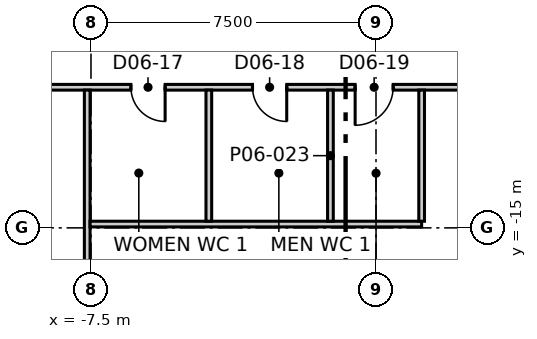
"""IFC4 building model, lengths in metres.
Left out: names, types, materials, properties, quantities, classifications, styles, units other than length and angle.
Written with IfcOpenShell. Run it as: python <this file> out.ifc"""

import sys

from ifc_helpers import new_model, si_unit, direction, frame, frame_2d, origin, place, context, subcontext, project, spatial, rectangle, extrude, element, fill, save


model = new_model("IFC4")
c1 = context("Model", 3, precision=1e-05, world=origin(), true_north=direction((0.0, 1.0)))
c2 = subcontext(c1, "Body", "Model", "MODEL_VIEW")
j1 = project(units=[si_unit("LENGTHUNIT", "METRE"), si_unit("PLANEANGLEUNIT", "RADIAN")], contexts=[c1])
p1 = place(None, origin())
s1 = spatial("IfcSite", under=j1, at=p1, CompositionType="ELEMENT")
p2 = place(p1, origin())
s2 = spatial("IfcBuilding", under=s1, at=p2, CompositionType="ELEMENT")
p3 = place(p2, frame((0.0, 0.0, 35.3)))
s3 = spatial("IfcBuildingStorey", under=s2, at=p3, CompositionType="ELEMENT", Elevation=35.3)
p4 = place(p3, frame((-3.462, 38.603, 0.0), z_axis=(0.0, 0.0, 1.0), x_axis=(-0.500012207976, -0.866018355391, 0.0)))
e1 = element("IfcWall", 1, at=p4, inside=s3, PredefinedType="ELEMENTEDWALL", context=c2, shape_type="SweptSolid", body=[
    extrude(rectangle(XDim=63.381, YDim=0.2, at=frame_2d((31.69, 0.0))), origin(), (0.0, 0.0, 1.0), 3.7),
])
p5 = place(p4, frame((2.302, 0.0, 0.9)))
e2 = element("IfcOpeningElement", 2, at=p5, cuts=e1, PredefinedType="OPENING", context=c2, shape_type="SweptSolid", body=[
    extrude(rectangle(XDim=5.6, YDim=2.5, at=frame_2d((2.8, 1.25))), frame((0.0, 0.11, 0.0), z_axis=(0.0, -1.0, 0.0), x_axis=(1.0, 0.0, 0.0)), (0.0, 0.0, 1.0), 0.22),
])
p6 = place(p4, frame((9.902, 0.0, 0.9)))
e3 = element("IfcOpeningElement", 3, at=p6, cuts=e1, PredefinedType="OPENING", context=c2, shape_type="SweptSolid", body=[
    extrude(rectangle(XDim=5.6, YDim=2.5, at=frame_2d((2.8, 1.25))), frame((0.0, 0.11, 0.0), z_axis=(0.0, -1.0, 0.0), x_axis=(1.0, 0.0, 0.0)), (0.0, 0.0, 1.0), 0.22),
])
p7 = place(p4, frame((17.501, 0.0, 0.9)))
e4 = element("IfcOpeningElement", 4, at=p7, cuts=e1, PredefinedType="OPENING", context=c2, shape_type="SweptSolid", body=[
    extrude(rectangle(XDim=5.6, YDim=2.5, at=frame_2d((2.8, 1.25))), frame((0.0, 0.11, 0.0), z_axis=(0.0, -1.0, 0.0), x_axis=(1.0, 0.0, 0.0)), (0.0, 0.0, 1.0), 0.22),
])
p8 = place(p4, frame((25.1, 0.0, 0.9)))
e5 = element("IfcOpeningElement", 5, at=p8, cuts=e1, PredefinedType="OPENING", context=c2, shape_type="SweptSolid", body=[
    extrude(rectangle(XDim=5.6, YDim=2.5, at=frame_2d((2.8, 1.25))), frame((0.0, 0.11, 0.0), z_axis=(0.0, -1.0, 0.0), x_axis=(1.0, 0.0, 0.0)), (0.0, 0.0, 1.0), 0.22),
])
p9 = place(p4, frame((32.7, 0.0, 0.9)))
e6 = element("IfcOpeningElement", 6, at=p9, cuts=e1, PredefinedType="OPENING", context=c2, shape_type="SweptSolid", body=[
    extrude(rectangle(XDim=5.6, YDim=2.5, at=frame_2d((2.8, 1.25))), frame((0.0, 0.11, 0.0), z_axis=(0.0, -1.0, 0.0), x_axis=(1.0, 0.0, 0.0)), (0.0, 0.0, 1.0), 0.22),
])
p10 = place(p4, frame((40.299, 0.0, 0.9)))
e7 = element("IfcOpeningElement", 7, at=p10, cuts=e1, PredefinedType="OPENING", context=c2, shape_type="SweptSolid", body=[
    extrude(rectangle(XDim=5.6, YDim=2.5, at=frame_2d((2.8, 1.25))), frame((0.0, 0.11, 0.0), z_axis=(0.0, -1.0, 0.0), x_axis=(1.0, 0.0, 0.0)), (0.0, 0.0, 1.0), 0.22),
])
p11 = place(p4, frame((47.899, 0.0, 0.9)))
e8 = element("IfcOpeningElement", 8, at=p11, cuts=e1, PredefinedType="OPENING", context=c2, shape_type="SweptSolid", body=[
    extrude(rectangle(XDim=5.6, YDim=2.5, at=frame_2d((2.8, 1.25))), frame((0.0, 0.11, 0.0), z_axis=(0.0, -1.0, 0.0), x_axis=(1.0, 0.0, 0.0)), (0.0, 0.0, 1.0), 0.22),
])
p12 = place(p4, frame((55.498, 0.0, 0.9)))
e9 = element("IfcOpeningElement", 9, at=p12, cuts=e1, PredefinedType="OPENING", context=c2, shape_type="SweptSolid", body=[
    extrude(rectangle(XDim=5.6, YDim=2.5, at=frame_2d((2.8, 1.25))), frame((0.0, 0.11, 0.0), z_axis=(0.0, -1.0, 0.0), x_axis=(1.0, 0.0, 0.0)), (0.0, 0.0, 1.0), 0.22),
])
p13 = place(p3, frame((-19.497, -11.17, 0.0), z_axis=(0.0, 0.0, 1.0), x_axis=(0.499998854553, 0.866026065108, 0.0)))
e10 = element("IfcWall", 10, at=p13, inside=s3, PredefinedType="PARTITIONING", context=c2, shape_type="SweptSolid", body=[
    extrude(rectangle(XDim=38.994, YDim=0.15, at=frame_2d((19.497, 0.0))), origin(), (0.0, 0.0, 1.0), 3.7),
])
p14 = place(p13, frame((36.244, 0.0, 0.0)))
e11 = element("IfcOpeningElement", 11, at=p14, cuts=e10, PredefinedType="OPENING", context=c2, shape_type="SweptSolid", body=[
    extrude(rectangle(XDim=1.1, YDim=2.1, at=frame_2d((0.55, 1.05))), frame((0.0, 0.085, 0.0), z_axis=(0.0, -1.0, 0.0), x_axis=(1.0, 0.0, 0.0)), (0.0, 0.0, 1.0), 0.17),
])
p15 = place(p13, frame((29.171, 0.0, 0.0)))
e12 = element("IfcOpeningElement", 12, at=p15, cuts=e10, PredefinedType="OPENING", context=c2, shape_type="SweptSolid", body=[
    extrude(rectangle(XDim=1.0, YDim=2.1, at=frame_2d((0.5, 1.05))), frame((0.0, 0.085, 0.0), z_axis=(0.0, -1.0, 0.0), x_axis=(1.0, 0.0, 0.0)), (0.0, 0.0, 1.0), 0.17),
])
p16 = place(p13, frame((32.971, 0.0, 0.0)))
e13 = element("IfcOpeningElement", 13, at=p16, cuts=e10, PredefinedType="OPENING", context=c2, shape_type="SweptSolid", body=[
    extrude(rectangle(XDim=0.9, YDim=2.1, at=frame_2d((0.45, 1.05))), frame((0.0, 0.085, 0.0), z_axis=(0.0, -1.0, 0.0), x_axis=(1.0, 0.0, 0.0)), (0.0, 0.0, 1.0), 0.17),
])
p17 = place(p13, frame((22.771, 0.0, 0.0)))
e14 = element("IfcOpeningElement", 14, at=p17, cuts=e10, PredefinedType="OPENING", context=c2, shape_type="SweptSolid", body=[
    extrude(rectangle(XDim=1.0, YDim=2.1, at=frame_2d((0.5, 1.05))), frame((0.0, 0.085, 0.0), z_axis=(0.0, -1.0, 0.0), x_axis=(1.0, 0.0, 0.0)), (0.0, 0.0, 1.0), 0.17),
])
p18 = place(p13, frame((6.872, 0.0, 0.0)))
e15 = element("IfcOpeningElement", 15, at=p18, cuts=e10, PredefinedType="OPENING", context=c2, shape_type="SweptSolid", body=[
    extrude(rectangle(XDim=1.1, YDim=2.1, at=frame_2d((0.55, 1.05))), frame((0.0, 0.085, 0.0), z_axis=(0.0, -1.0, 0.0), x_axis=(1.0, 0.0, 0.0)), (0.0, 0.0, 1.0), 0.17),
])
p19 = place(p13, frame((17.372, 0.0, 0.0)))
e16 = element("IfcOpeningElement", 16, at=p19, cuts=e10, PredefinedType="OPENING", context=c2, shape_type="SweptSolid", body=[
    extrude(rectangle(XDim=0.9, YDim=2.1, at=frame_2d((0.45, 1.05))), frame((0.0, 0.085, 0.0), z_axis=(0.0, -1.0, 0.0), x_axis=(1.0, 0.0, 0.0)), (0.0, 0.0, 1.0), 0.17),
])
p20 = place(p13, frame((14.172, 0.0, 0.0)))
e17 = element("IfcOpeningElement", 17, at=p20, cuts=e10, PredefinedType="OPENING", context=c2, shape_type="SweptSolid", body=[
    extrude(rectangle(XDim=0.9, YDim=2.1, at=frame_2d((0.45, 1.05))), frame((0.0, 0.085, 0.0), z_axis=(0.0, -1.0, 0.0), x_axis=(1.0, 0.0, 0.0)), (0.0, 0.0, 1.0), 0.17),
])
p21 = place(p13, frame((11.272, 0.0, 0.0)))
e18 = element("IfcOpeningElement", 18, at=p21, cuts=e10, PredefinedType="OPENING", context=c2, shape_type="SweptSolid", body=[
    extrude(rectangle(XDim=1.0, YDim=2.1, at=frame_2d((0.5, 1.05))), frame((0.0, 0.085, 0.0), z_axis=(0.0, -1.0, 0.0), x_axis=(1.0, 0.0, 0.0)), (0.0, 0.0, 1.0), 0.17),
])
p22 = place(p13, frame((1.473, 0.0, 0.0)))
e19 = element("IfcOpeningElement", 19, at=p22, cuts=e10, PredefinedType="OPENING", context=c2, shape_type="SweptSolid", body=[
    extrude(rectangle(XDim=1.1, YDim=2.1, at=frame_2d((0.55, 1.05))), frame((0.0, 0.085, 0.0), z_axis=(0.0, -1.0, 0.0), x_axis=(1.0, 0.0, 0.0)), (0.0, 0.0, 1.0), 0.17),
])
p23 = place(p3, frame((-19.422, -11.3, 0.0), z_axis=(0.0, 0.0, 1.0), x_axis=(1.0, 0.0, 0.0)))
e20 = element("IfcWall", 20, at=p23, inside=s3, PredefinedType="PARTITIONING", context=c2, shape_type="SweptSolid", body=[
    extrude(rectangle(XDim=38.994, YDim=0.15, at=frame_2d((19.497, 0.0))), origin(), (0.0, 0.0, 1.0), 3.7),
])
p24 = place(p23, frame((1.5, 0.0, 0.0)))
e21 = element("IfcOpeningElement", 21, at=p24, cuts=e20, PredefinedType="OPENING", context=c2, shape_type="SweptSolid", body=[
    extrude(rectangle(XDim=1.1, YDim=2.1, at=frame_2d((0.55, 1.05))), frame((0.0, 0.085, 0.0), z_axis=(0.0, -1.0, 0.0), x_axis=(1.0, 0.0, 0.0)), (0.0, 0.0, 1.0), 0.17),
])
p25 = place(p23, frame((8.674, 0.0, 0.0)))
e22 = element("IfcOpeningElement", 22, at=p25, cuts=e20, PredefinedType="OPENING", context=c2, shape_type="SweptSolid", body=[
    extrude(rectangle(XDim=1.0, YDim=2.1, at=frame_2d((0.5, 1.05))), frame((0.0, 0.085, 0.0), z_axis=(0.0, -1.0, 0.0), x_axis=(1.0, 0.0, 0.0)), (0.0, 0.0, 1.0), 0.17),
])
p26 = place(p23, frame((4.974, 0.0, 0.0)))
e23 = element("IfcOpeningElement", 23, at=p26, cuts=e20, PredefinedType="OPENING", context=c2, shape_type="SweptSolid", body=[
    extrude(rectangle(XDim=0.9, YDim=2.1, at=frame_2d((0.45, 1.05))), frame((0.0, 0.085, 0.0), z_axis=(0.0, -1.0, 0.0), x_axis=(1.0, 0.0, 0.0)), (0.0, 0.0, 1.0), 0.17),
])
p27 = place(p23, frame((23.273, 0.0, 0.0)))
e24 = element("IfcOpeningElement", 24, at=p27, cuts=e20, PredefinedType="OPENING", context=c2, shape_type="SweptSolid", body=[
    extrude(rectangle(XDim=1.1, YDim=2.1, at=frame_2d((0.55, 1.05))), frame((0.0, 0.085, 0.0), z_axis=(0.0, -1.0, 0.0), x_axis=(1.0, 0.0, 0.0)), (0.0, 0.0, 1.0), 0.17),
])
p28 = place(p23, frame((12.973, 0.0, 0.0)))
e25 = element("IfcOpeningElement", 25, at=p28, cuts=e20, PredefinedType="OPENING", context=c2, shape_type="SweptSolid", body=[
    extrude(rectangle(XDim=0.9, YDim=2.1, at=frame_2d((0.45, 1.05))), frame((0.0, 0.085, 0.0), z_axis=(0.0, -1.0, 0.0), x_axis=(1.0, 0.0, 0.0)), (0.0, 0.0, 1.0), 0.17),
])
p29 = place(p23, frame((16.173, 0.0, 0.0)))
e26 = element("IfcOpeningElement", 26, at=p29, cuts=e20, PredefinedType="OPENING", context=c2, shape_type="SweptSolid", body=[
    extrude(rectangle(XDim=0.9, YDim=2.1, at=frame_2d((0.45, 1.05))), frame((0.0, 0.085, 0.0), z_axis=(0.0, -1.0, 0.0), x_axis=(1.0, 0.0, 0.0)), (0.0, 0.0, 1.0), 0.17),
])
p30 = place(p23, frame((18.873, 0.0, 0.0)))
e27 = element("IfcOpeningElement", 27, at=p30, cuts=e20, PredefinedType="OPENING", context=c2, shape_type="SweptSolid", body=[
    extrude(rectangle(XDim=1.0, YDim=2.1, at=frame_2d((0.5, 1.05))), frame((0.0, 0.085, 0.0), z_axis=(0.0, -1.0, 0.0), x_axis=(1.0, 0.0, 0.0)), (0.0, 0.0, 1.0), 0.17),
])
p31 = place(p23, frame((32.471, 0.0, 0.0)))
e28 = element("IfcOpeningElement", 28, at=p31, cuts=e20, PredefinedType="OPENING", context=c2, shape_type="SweptSolid", body=[
    extrude(rectangle(XDim=1.0, YDim=2.1, at=frame_2d((0.5, 1.05))), frame((0.0, 0.085, 0.0), z_axis=(0.0, -1.0, 0.0), x_axis=(1.0, 0.0, 0.0)), (0.0, 0.0, 1.0), 0.17),
])
p32 = place(p3, frame((-7.599, -22.22, 0.0), z_axis=(0.0, 0.0, 1.0), x_axis=(0.0, 1.0, 0.0)))
e29 = element("IfcWall", 29, at=p32, inside=s3, PredefinedType="PARTITIONING", context=c2, shape_type="SweptSolid", body=[
    extrude(rectangle(XDim=10.845, YDim=0.15, at=frame_2d((5.422, 0.0))), origin(), (0.0, 0.0, 1.0), 3.7),
])
p33 = place(p3, frame((-7.524, -14.9, 0.0), z_axis=(0.0, 0.0, 1.0), x_axis=(1.0, 0.0, 0.0)))
e30 = element("IfcWall", 30, at=p33, inside=s3, PredefinedType="PARTITIONING", context=c2, shape_type="SweptSolid", body=[
    extrude(rectangle(XDim=8.725, YDim=0.15, at=frame_2d((4.362, 0.0))), origin(), (0.0, 0.0, 1.0), 3.7),
])
for number, where, z_axis, x_axis in (
    (31, (-4.399, -14.825, 0.0), (0.0, 0.0, 1.0), (0.0, 1.0, 0.0)),
    (32, (1.201, -14.825, 0.0), (0.0, 0.0, 1.0), (0.0, 1.0, 0.0)),
    (33, (-1.199, -14.825, 0.0), (0.0, 0.0, 1.0), (0.0, 1.0, 0.0)),
):
    element("IfcWall", number, at=place(p3, frame(where, z_axis=z_axis, x_axis=x_axis)), inside=s3, PredefinedType="PARTITIONING", context=c2, shape_type="SweptSolid", body=[
        extrude(rectangle(XDim=3.45, YDim=0.15, at=frame_2d((1.725, 0.0))), origin(), (0.0, 0.0, 1.0), 3.7),
    ])
p34 = place(p3, frame((0.075, 22.47, 0.0), z_axis=(0.0, 0.0, 1.0), x_axis=(0.500002280369, -0.866024087209, 0.0)))
e34 = element("IfcWall", 34, at=p34, inside=s3, PredefinedType="PARTITIONING", context=c2, shape_type="SweptSolid", body=[
    extrude(rectangle(XDim=38.844, YDim=0.15, at=frame_2d((19.422, 0.0))), origin(), (0.0, 0.0, 1.0), 3.7),
])
p35 = place(p34, frame((36.244, 0.0, 0.0)))
e35 = element("IfcOpeningElement", 35, at=p35, cuts=e34, PredefinedType="OPENING", context=c2, shape_type="SweptSolid", body=[
    extrude(rectangle(XDim=1.1, YDim=2.1, at=frame_2d((0.55, 1.05))), frame((0.0, 0.085, 0.0), z_axis=(0.0, -1.0, 0.0), x_axis=(1.0, 0.0, 0.0)), (0.0, 0.0, 1.0), 0.17),
])
p36 = place(p34, frame((26.472, 0.0, 0.0)))
e36 = element("IfcOpeningElement", 36, at=p36, cuts=e34, PredefinedType="OPENING", context=c2, shape_type="SweptSolid", body=[
    extrude(rectangle(XDim=1.1, YDim=2.1, at=frame_2d((0.55, 1.05))), frame((0.0, 0.085, 0.0), z_axis=(0.0, -1.0, 0.0), x_axis=(1.0, 0.0, 0.0)), (0.0, 0.0, 1.0), 0.17),
])
p37 = place(p34, frame((8.872, 0.0, 0.0)))
e37 = element("IfcOpeningElement", 37, at=p37, cuts=e34, PredefinedType="OPENING", context=c2, shape_type="SweptSolid", body=[
    extrude(rectangle(XDim=1.1, YDim=2.1, at=frame_2d((0.55, 1.05))), frame((0.0, 0.085, 0.0), z_axis=(0.0, -1.0, 0.0), x_axis=(1.0, 0.0, 0.0)), (0.0, 0.0, 1.0), 0.17),
])
p38 = place(p34, frame((17.672, 0.0, 0.0)))
e38 = element("IfcOpeningElement", 38, at=p38, cuts=e34, PredefinedType="OPENING", context=c2, shape_type="SweptSolid", body=[
    extrude(rectangle(XDim=0.9, YDim=2.1, at=frame_2d((0.45, 1.05))), frame((0.0, 0.085, 0.0), z_axis=(0.0, -1.0, 0.0), x_axis=(1.0, 0.0, 0.0)), (0.0, 0.0, 1.0), 0.17),
])
p39 = place(p34, frame((15.272, 0.0, 0.0)))
e39 = element("IfcOpeningElement", 39, at=p39, cuts=e34, PredefinedType="OPENING", context=c2, shape_type="SweptSolid", body=[
    extrude(rectangle(XDim=0.9, YDim=2.1, at=frame_2d((0.45, 1.05))), frame((0.0, 0.085, 0.0), z_axis=(0.0, -1.0, 0.0), x_axis=(1.0, 0.0, 0.0)), (0.0, 0.0, 1.0), 0.17),
])
p40 = place(p34, frame((1.473, 0.0, 0.0)))
e40 = element("IfcOpeningElement", 40, at=p40, cuts=e34, PredefinedType="OPENING", context=c2, shape_type="SweptSolid", body=[
    extrude(rectangle(XDim=1.1, YDim=2.1, at=frame_2d((0.55, 1.05))), frame((0.0, 0.085, 0.0), z_axis=(0.0, -1.0, 0.0), x_axis=(1.0, 0.0, 0.0)), (0.0, 0.0, 1.0), 0.17),
])
p41 = place(p28, origin())
e41 = element("IfcDoor", 41, at=p41, inside=s3, OperationType="SINGLE_SWING_RIGHT", PredefinedType="DOOR", context=c2, shape_type="SweptSolid", body=[
    extrude(rectangle(XDim=0.9, YDim=2.1, at=frame_2d((0.45, 1.05))), frame((0.0, 0.025, 0.0), z_axis=(0.0, -1.0, 0.0), x_axis=(1.0, 0.0, 0.0)), (0.0, 0.0, 1.0), 0.05),
])
fill(e25, e41)
p42 = place(p29, origin())
e42 = element("IfcDoor", 42, at=p42, inside=s3, OperationType="SINGLE_SWING_RIGHT", PredefinedType="DOOR", context=c2, shape_type="SweptSolid", body=[
    extrude(rectangle(XDim=0.9, YDim=2.1, at=frame_2d((0.45, 1.05))), frame((0.0, 0.025, 0.0), z_axis=(0.0, -1.0, 0.0), x_axis=(1.0, 0.0, 0.0)), (0.0, 0.0, 1.0), 0.05),
])
fill(e26, e42)
p43 = place(p30, origin())
e43 = element("IfcDoor", 43, at=p43, inside=s3, OperationType="SINGLE_SWING_LEFT", PredefinedType="DOOR", context=c2, shape_type="SweptSolid", body=[
    extrude(rectangle(XDim=1.0, YDim=2.1, at=frame_2d((0.5, 1.05))), frame((0.0, 0.025, 0.0), z_axis=(0.0, -1.0, 0.0), x_axis=(1.0, 0.0, 0.0)), (0.0, 0.0, 1.0), 0.05),
])
fill(e27, e43)
save(model, sys.argv[1])
